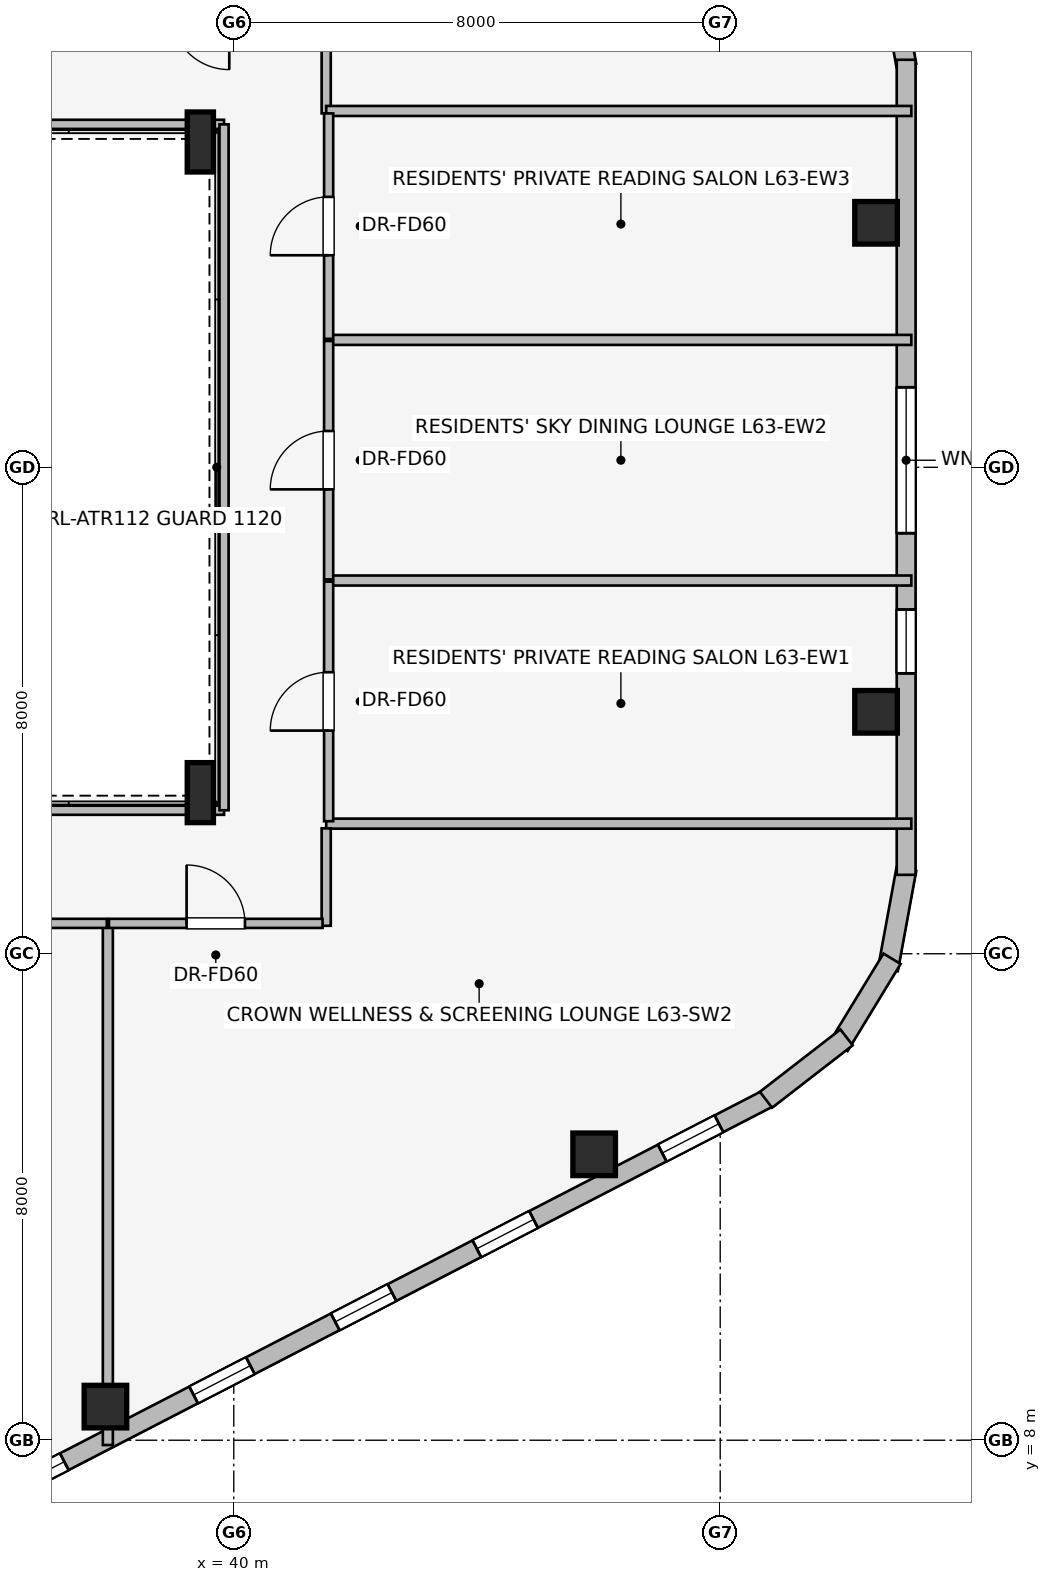
"""IFC4 building model, lengths in metres.
Left out: names, types, materials, properties, quantities, classifications, styles, units other than length and angle.
Written with IfcOpenShell. Run it as: python <this file> out.ifc"""

import sys

from ifc_helpers import new_model, si_unit, direction, frame, frame_2d, origin, origin_2d, place, context, subcontext, project, spatial, rectangle, i_section, extrude, element, fill, save


model = new_model("IFC4")
c1 = context("Model", 3, precision=1e-05, world=origin(), true_north=direction((0.0, 1.0)))
c2 = subcontext(c1, "Body", "Model", "MODEL_VIEW")
j1 = project(units=[si_unit("LENGTHUNIT", "METRE"), si_unit("PLANEANGLEUNIT", "RADIAN")], contexts=[c1])
p1 = place(None, origin())
s1 = spatial("IfcSite", under=j1, at=p1, CompositionType="ELEMENT")
p2 = place(p1, origin())
s2 = spatial("IfcBuilding", under=s1, at=p2, CompositionType="ELEMENT")
p3 = place(p2, frame((0.0, 0.0, 231.25)))
s3 = spatial("IfcBuildingStorey", under=s2, at=p3, CompositionType="ELEMENT", Elevation=231.25)
for number, where, z_axis, x_axis in (
    (1, (37.889, 8.553, 0.0), (0.0, 0.0, 1.0), (1.0, 0.0, 0.0)),
    (2, (45.927, 12.702, 0.0), (0.0, 0.0, 1.0), (1.0, 0.0, 0.0)),
    (3, (50.563, 19.979, 0.0), (0.0, 0.0, 1.0), (1.0, 0.0, 0.0)),
    (4, (50.563, 28.021, 0.0), (0.0, 0.0, 1.0), (1.0, 0.0, 0.0)),
):
    element("IfcColumn", number, at=place(p3, frame(where, z_axis=z_axis, x_axis=x_axis)), inside=s3, PredefinedType="COLUMN", context=c2, shape_type="SweptSolid", body=[
        extrude(rectangle(XDim=0.7, YDim=0.7, at=origin_2d()), origin(), (0.0, 0.0, 1.0), 3.55),
    ])
for number, where, z_axis, x_axis in (
    (5, (39.45, 18.65, 0.0), (0.0, 0.0, 1.0), (1.0, 0.0, 0.0)),
    (6, (39.45, 29.35, 0.0), (0.0, 0.0, 1.0), (1.0, 0.0, 0.0)),
):
    element("IfcColumn", number, at=place(p3, frame(where, z_axis=z_axis, x_axis=x_axis)), inside=s3, PredefinedType="COLUMN", context=c2, shape_type="SweptSolid", body=[
        extrude(i_section(OverallWidth=0.431, OverallDepth=0.987, WebThickness=0.034, FlangeThickness=0.062, at=origin_2d()), origin(), (0.0, 0.0, 1.0), 3.55),
    ])
p4 = place(p3, frame((50.759, 32.257, 0.0), z_axis=(0.0, 0.0, 1.0), x_axis=(0.180691763044, -0.983539773862, 0.0)))
e7 = element("IfcWall", 7, at=p4, inside=s3, PredefinedType="STANDARD", context=c2, shape_type="SweptSolid", body=[
    extrude(rectangle(XDim=1.677, YDim=0.33, at=frame_2d((0.838, 0.0))), origin(), (0.0, 0.0, 1.0), 3.26),
])
p5 = place(p3, frame((48.834, 13.646, 0.0), z_axis=(0.0, 0.0, 1.0), x_axis=(-0.888581481622, -0.458718814218, 0.0)))
e8 = element("IfcWall", 8, at=p5, inside=s3, PredefinedType="STANDARD", context=c2, shape_type="SweptSolid", body=[
    extrude(rectangle(XDim=15.077, YDim=0.31, at=frame_2d((7.539, 0.0))), origin(), (0.0, 0.0, 1.0), 3.26),
])
p6 = place(p5, frame((0.962, 0.0, 0.75)))
e9 = element("IfcOpeningElement", 9, at=p6, cuts=e8, PredefinedType="OPENING", context=c2, shape_type="SweptSolid", body=[
    extrude(rectangle(XDim=1.05, YDim=1.4, at=frame_2d((0.525, 0.7))), frame((0.0, 0.165, 0.0), z_axis=(0.0, -1.0, 0.0), x_axis=(1.0, 0.0, 0.0)), (0.0, 0.0, 1.0), 0.33),
])
p7 = place(p5, frame((4.393, 0.0, 0.75)))
e10 = element("IfcOpeningElement", 10, at=p7, cuts=e8, PredefinedType="OPENING", context=c2, shape_type="SweptSolid", body=[
    extrude(rectangle(XDim=1.05, YDim=1.4, at=frame_2d((0.525, 0.7))), frame((0.0, 0.165, 0.0), z_axis=(0.0, -1.0, 0.0), x_axis=(1.0, 0.0, 0.0)), (0.0, 0.0, 1.0), 0.33),
])
p8 = place(p5, frame((7.014, 0.0, 0.75)))
e11 = element("IfcOpeningElement", 11, at=p8, cuts=e8, PredefinedType="OPENING", context=c2, shape_type="SweptSolid", body=[
    extrude(rectangle(XDim=1.05, YDim=1.4, at=frame_2d((0.525, 0.7))), frame((0.0, 0.165, 0.0), z_axis=(0.0, -1.0, 0.0), x_axis=(1.0, 0.0, 0.0)), (0.0, 0.0, 1.0), 0.33),
])
p9 = place(p5, frame((9.635, 0.0, 0.75)))
e12 = element("IfcOpeningElement", 12, at=p9, cuts=e8, PredefinedType="OPENING", context=c2, shape_type="SweptSolid", body=[
    extrude(rectangle(XDim=1.05, YDim=1.4, at=frame_2d((0.525, 0.7))), frame((0.0, 0.165, 0.0), z_axis=(0.0, -1.0, 0.0), x_axis=(1.0, 0.0, 0.0)), (0.0, 0.0, 1.0), 0.33),
])
p10 = place(p5, frame((13.078, 0.0, 0.75)))
e13 = element("IfcOpeningElement", 13, at=p10, cuts=e8, PredefinedType="OPENING", context=c2, shape_type="SweptSolid", body=[
    extrude(rectangle(XDim=1.05, YDim=1.4, at=frame_2d((0.525, 0.7))), frame((0.0, 0.165, 0.0), z_axis=(0.0, -1.0, 0.0), x_axis=(1.0, 0.0, 0.0)), (0.0, 0.0, 1.0), 0.33),
])
p11 = place(p3, frame((51.062, 17.392, 0.0), z_axis=(0.0, 0.0, 1.0), x_axis=(-0.180691763044, -0.983539773862, 0.0)))
e14 = element("IfcWall", 14, at=p11, inside=s3, PredefinedType="STANDARD", context=c2, shape_type="SweptSolid", body=[
    extrude(rectangle(XDim=1.677, YDim=0.33, at=frame_2d((0.838, 0.0))), origin(), (0.0, 0.0, 1.0), 3.26),
])
p12 = place(p3, frame((50.826, 15.918, 0.0), z_axis=(0.0, 0.0, 1.0), x_axis=(-0.520325409202, -0.853968072318, 0.0)))
e15 = element("IfcWall", 15, at=p12, inside=s3, PredefinedType="STANDARD", context=c2, shape_type="SweptSolid", body=[
    extrude(rectangle(XDim=1.678, YDim=0.33, at=frame_2d((0.839, 0.0))), origin(), (0.0, 0.0, 1.0), 3.26),
])
p13 = place(p3, frame((50.078, 14.625, 0.0), z_axis=(0.0, 0.0, 1.0), x_axis=(-0.790691856293, -0.61221433207, 0.0)))
e16 = element("IfcWall", 16, at=p13, inside=s3, PredefinedType="STANDARD", context=c2, shape_type="SweptSolid", body=[
    extrude(rectangle(XDim=1.676, YDim=0.33, at=frame_2d((0.838, 0.0))), origin(), (0.0, 0.0, 1.0), 3.26),
])
p14 = place(p3, frame((51.058, 30.702, 0.0), z_axis=(0.0, 0.0, 1.0), x_axis=(0.0, -1.0, 0.0)))
e17 = element("IfcWall", 17, at=p14, inside=s3, PredefinedType="STANDARD", context=c2, shape_type="SweptSolid", body=[
    extrude(rectangle(XDim=13.404, YDim=0.31, at=frame_2d((6.702, 0.0))), origin(), (0.0, 0.0, 1.0), 3.26),
])
p15 = place(p14, frame((5.386, 0.0, 0.75)))
e18 = element("IfcOpeningElement", 18, at=p15, cuts=e17, PredefinedType="OPENING", context=c2, shape_type="SweptSolid", body=[
    extrude(rectangle(XDim=2.4, YDim=1.6, at=frame_2d((1.2, 0.8))), frame((0.0, 0.165, 0.0), z_axis=(0.0, -1.0, 0.0), x_axis=(1.0, 0.0, 0.0)), (0.0, 0.0, 1.0), 0.33),
])
p16 = place(p14, frame((9.04, 0.0, 0.75)))
e19 = element("IfcOpeningElement", 19, at=p16, cuts=e17, PredefinedType="OPENING", context=c2, shape_type="SweptSolid", body=[
    extrude(rectangle(XDim=1.05, YDim=1.4, at=frame_2d((0.525, 0.7))), frame((0.0, 0.165, 0.0), z_axis=(0.0, -1.0, 0.0), x_axis=(1.0, 0.0, 0.0)), (0.0, 0.0, 1.0), 0.33),
])
p17 = place(p3, frame((27.675, 18.36, 0.0), z_axis=(0.0, 0.0, 1.0), x_axis=(1.0, 0.0, 0.0)))
e20 = element("IfcWall", 20, at=p17, inside=s3, PredefinedType="PARTITIONING", context=c2, shape_type="SweptSolid", body=[
    extrude(rectangle(XDim=12.165, YDim=0.15, at=frame_2d((6.083, 0.0))), origin(), (0.0, 0.0, 1.0), 2.401),
])
p18 = place(p3, frame((39.84, 29.64, 0.0), z_axis=(0.0, 0.0, 1.0), x_axis=(-1.0, 0.0, 0.0)))
e21 = element("IfcWall", 21, at=p18, inside=s3, PredefinedType="PARTITIONING", context=c2, shape_type="SweptSolid", body=[
    extrude(rectangle(XDim=12.203, YDim=0.15, at=frame_2d((6.102, 0.0))), origin(), (0.0, 0.0, 1.0), 2.401),
])
p19 = place(p3, frame((39.84, 18.36, 0.0), z_axis=(0.0, 0.0, 1.0), x_axis=(0.0, 1.0, 0.0)))
e22 = element("IfcWall", 22, at=p19, inside=s3, PredefinedType="PARTITIONING", context=c2, shape_type="SweptSolid", body=[
    extrude(rectangle(XDim=11.28, YDim=0.15, at=frame_2d((5.64, 0.0))), origin(), (0.0, 0.0, 1.0), 3.26),
])
p20 = place(p3, frame((41.52, 29.82, 0.0), z_axis=(0.0, 0.0, 1.0), x_axis=(0.0, 1.0, 0.0)))
e23 = element("IfcWall", 23, at=p20, inside=s3, PredefinedType="PARTITIONING", context=c2, shape_type="SweptSolid", body=[
    extrude(rectangle(XDim=1.72, YDim=0.15, at=frame_2d((0.86, 0.0))), origin(), (0.0, 0.0, 1.0), 3.26),
])
for number, where, z_axis, x_axis in (
    (24, (41.52, 18.14, 0.0), (0.0, 0.0, 1.0), (1.0, 0.0, 0.0)),
    (25, (41.52, 29.86, 0.0), (0.0, 0.0, 1.0), (1.0, 0.0, 0.0)),
):
    element("IfcWall", number, at=place(p3, frame(where, z_axis=z_axis, x_axis=x_axis)), inside=s3, PredefinedType="PARTITIONING", context=c2, shape_type="SweptSolid", body=[
        extrude(rectangle(XDim=9.623, YDim=0.165, at=frame_2d((4.812, 0.0))), origin(), (0.0, 0.0, 1.0), 3.26),
    ])
for number, where, z_axis, x_axis in (
    (26, (41.59, 22.138, 0.0), (0.0, 0.0, 1.0), (1.0, 0.0, 0.0)),
    (27, (41.59, 26.095, 0.0), (0.0, 0.0, 1.0), (1.0, 0.0, 0.0)),
):
    element("IfcWall", number, at=place(p3, frame(where, z_axis=z_axis, x_axis=x_axis)), inside=s3, PredefinedType="PARTITIONING", context=c2, shape_type="SweptSolid", body=[
        extrude(rectangle(XDim=9.553, YDim=0.165, at=frame_2d((4.776, 0.0))), origin(), (0.0, 0.0, 1.0), 3.26),
    ])
p21 = place(p3, frame((41.56, 18.18, 0.0), z_axis=(0.0, 0.0, 1.0), x_axis=(0.0, 1.0, 0.0)))
e28 = element("IfcWall", 28, at=p21, inside=s3, PredefinedType="PARTITIONING", context=c2, shape_type="SweptSolid", body=[
    extrude(rectangle(XDim=3.94, YDim=0.15, at=frame_2d((1.97, 0.0))), origin(), (0.0, 0.0, 1.0), 3.26),
])
p22 = place(p21, frame((1.49, 0.0, 0.0)))
e29 = element("IfcOpeningElement", 29, at=p22, cuts=e28, PredefinedType="OPENING", context=c2, shape_type="SweptSolid", body=[
    extrude(rectangle(XDim=0.96, YDim=2.0, at=frame_2d((0.48, 1.0))), frame((0.0, 0.085, 0.0), z_axis=(0.0, -1.0, 0.0), x_axis=(1.0, 0.0, 0.0)), (0.0, 0.0, 1.0), 0.17),
])
p23 = place(p3, frame((41.56, 22.156, 0.0), z_axis=(0.0, 0.0, 1.0), x_axis=(0.0, 1.0, 0.0)))
e30 = element("IfcWall", 30, at=p23, inside=s3, PredefinedType="PARTITIONING", context=c2, shape_type="SweptSolid", body=[
    extrude(rectangle(XDim=3.921, YDim=0.15, at=frame_2d((1.96, 0.0))), origin(), (0.0, 0.0, 1.0), 3.26),
])
p24 = place(p23, frame((1.481, 0.0, 0.0)))
e31 = element("IfcOpeningElement", 31, at=p24, cuts=e30, PredefinedType="OPENING", context=c2, shape_type="SweptSolid", body=[
    extrude(rectangle(XDim=0.96, YDim=2.0, at=frame_2d((0.48, 1.0))), frame((0.0, 0.085, 0.0), z_axis=(0.0, -1.0, 0.0), x_axis=(1.0, 0.0, 0.0)), (0.0, 0.0, 1.0), 0.17),
])
p25 = place(p3, frame((41.56, 26.113, 0.0), z_axis=(0.0, 0.0, 1.0), x_axis=(0.0, 1.0, 0.0)))
e32 = element("IfcWall", 32, at=p25, inside=s3, PredefinedType="PARTITIONING", context=c2, shape_type="SweptSolid", body=[
    extrude(rectangle(XDim=3.707, YDim=0.15, at=frame_2d((1.854, 0.0))), origin(), (0.0, 0.0, 1.0), 3.26),
])
p26 = place(p25, frame((1.374, 0.0, 0.0)))
e33 = element("IfcOpeningElement", 33, at=p26, cuts=e32, PredefinedType="OPENING", context=c2, shape_type="SweptSolid", body=[
    extrude(rectangle(XDim=0.96, YDim=2.0, at=frame_2d((0.48, 1.0))), frame((0.0, 0.085, 0.0), z_axis=(0.0, -1.0, 0.0), x_axis=(1.0, 0.0, 0.0)), (0.0, 0.0, 1.0), 0.17),
])
p27 = place(p3, frame((41.52, 16.46, 0.0), z_axis=(0.0, 0.0, 1.0), x_axis=(0.0, 1.0, 0.0)))
e34 = element("IfcWall", 34, at=p27, inside=s3, PredefinedType="PARTITIONING", context=c2, shape_type="SweptSolid", body=[
    extrude(rectangle(XDim=1.602, YDim=0.15, at=frame_2d((0.801, 0.0))), origin(), (0.0, 0.0, 1.0), 3.26),
])
p28 = place(p3, frame((37.929, 7.921, 0.0), z_axis=(0.0, 0.0, 1.0), x_axis=(0.0, 1.0, 0.0)))
e35 = element("IfcWall", 35, at=p28, inside=s3, PredefinedType="PARTITIONING", context=c2, shape_type="SweptSolid", body=[
    extrude(rectangle(XDim=8.549, YDim=0.165, at=frame_2d((4.274, 0.0))), origin(), (0.0, 0.0, 1.0), 3.26),
])
p29 = place(p3, frame((32.85, 16.5, 0.0), z_axis=(0.0, 0.0, 1.0), x_axis=(1.0, 0.0, 0.0)))
e36 = element("IfcWall", 36, at=p29, inside=s3, PredefinedType="PARTITIONING", context=c2, shape_type="SweptSolid", body=[
    extrude(rectangle(XDim=5.061, YDim=0.15, at=frame_2d((2.53, 0.0))), origin(), (0.0, 0.0, 1.0), 3.26),
])
p30 = place(p29, frame((2.051, 0.0, 0.0)))
e37 = element("IfcOpeningElement", 37, at=p30, cuts=e36, PredefinedType="OPENING", context=c2, shape_type="SweptSolid", body=[
    extrude(rectangle(XDim=0.96, YDim=2.0, at=frame_2d((0.48, 1.0))), frame((0.0, 0.085, 0.0), z_axis=(0.0, -1.0, 0.0), x_axis=(1.0, 0.0, 0.0)), (0.0, 0.0, 1.0), 0.17),
])
p31 = place(p3, frame((37.947, 16.5, 0.0), z_axis=(0.0, 0.0, 1.0), x_axis=(1.0, 0.0, 0.0)))
e38 = element("IfcWall", 38, at=p31, inside=s3, PredefinedType="PARTITIONING", context=c2, shape_type="SweptSolid", body=[
    extrude(rectangle(XDim=3.513, YDim=0.15, at=frame_2d((1.756, 0.0))), origin(), (0.0, 0.0, 1.0), 3.26),
])
p32 = place(p31, frame((1.277, 0.0, 0.0)))
e39 = element("IfcOpeningElement", 39, at=p32, cuts=e38, PredefinedType="OPENING", context=c2, shape_type="SweptSolid", body=[
    extrude(rectangle(XDim=0.96, YDim=2.0, at=frame_2d((0.48, 1.0))), frame((0.0, 0.085, 0.0), z_axis=(0.0, -1.0, 0.0), x_axis=(1.0, 0.0, 0.0)), (0.0, 0.0, 1.0), 0.17),
])
p33 = place(p6, origin())
e40 = element("IfcWindow", 40, at=p33, inside=s3, PartitioningType="SINGLE_PANEL", PredefinedType="WINDOW", context=c2, shape_type="SweptSolid", body=[
    extrude(rectangle(XDim=1.05, YDim=1.4, at=frame_2d((0.525, 0.7))), frame((0.0, 0.03, 0.0), z_axis=(0.0, -1.0, 0.0), x_axis=(1.0, 0.0, 0.0)), (0.0, 0.0, 1.0), 0.06),
])
fill(e9, e40)
p34 = place(p7, origin())
e41 = element("IfcWindow", 41, at=p34, inside=s3, PartitioningType="SINGLE_PANEL", PredefinedType="WINDOW", context=c2, shape_type="SweptSolid", body=[
    extrude(rectangle(XDim=1.05, YDim=1.4, at=frame_2d((0.525, 0.7))), frame((0.0, 0.03, 0.0), z_axis=(0.0, -1.0, 0.0), x_axis=(1.0, 0.0, 0.0)), (0.0, 0.0, 1.0), 0.06),
])
fill(e10, e41)
p35 = place(p8, origin())
e42 = element("IfcWindow", 42, at=p35, inside=s3, PartitioningType="SINGLE_PANEL", PredefinedType="WINDOW", context=c2, shape_type="SweptSolid", body=[
    extrude(rectangle(XDim=1.05, YDim=1.4, at=frame_2d((0.525, 0.7))), frame((0.0, 0.03, 0.0), z_axis=(0.0, -1.0, 0.0), x_axis=(1.0, 0.0, 0.0)), (0.0, 0.0, 1.0), 0.06),
])
fill(e11, e42)
p36 = place(p9, origin())
e43 = element("IfcWindow", 43, at=p36, inside=s3, PartitioningType="SINGLE_PANEL", PredefinedType="WINDOW", context=c2, shape_type="SweptSolid", body=[
    extrude(rectangle(XDim=1.05, YDim=1.4, at=frame_2d((0.525, 0.7))), frame((0.0, 0.03, 0.0), z_axis=(0.0, -1.0, 0.0), x_axis=(1.0, 0.0, 0.0)), (0.0, 0.0, 1.0), 0.06),
])
fill(e12, e43)
p37 = place(p10, origin())
e44 = element("IfcWindow", 44, at=p37, inside=s3, PartitioningType="SINGLE_PANEL", PredefinedType="WINDOW", context=c2, shape_type="SweptSolid", body=[
    extrude(rectangle(XDim=1.05, YDim=1.4, at=frame_2d((0.525, 0.7))), frame((0.0, 0.03, 0.0), z_axis=(0.0, -1.0, 0.0), x_axis=(1.0, 0.0, 0.0)), (0.0, 0.0, 1.0), 0.06),
])
fill(e13, e44)
p38 = place(p15, origin())
e45 = element("IfcWindow", 45, at=p38, inside=s3, PartitioningType="SINGLE_PANEL", PredefinedType="WINDOW", context=c2, shape_type="SweptSolid", body=[
    extrude(rectangle(XDim=2.4, YDim=1.6, at=frame_2d((1.2, 0.8))), frame((0.0, 0.03, 0.0), z_axis=(0.0, -1.0, 0.0), x_axis=(1.0, 0.0, 0.0)), (0.0, 0.0, 1.0), 0.06),
])
fill(e18, e45)
p39 = place(p16, origin())
e46 = element("IfcWindow", 46, at=p39, inside=s3, PartitioningType="SINGLE_PANEL", PredefinedType="WINDOW", context=c2, shape_type="SweptSolid", body=[
    extrude(rectangle(XDim=1.05, YDim=1.4, at=frame_2d((0.525, 0.7))), frame((0.0, 0.03, 0.0), z_axis=(0.0, -1.0, 0.0), x_axis=(1.0, 0.0, 0.0)), (0.0, 0.0, 1.0), 0.06),
])
fill(e19, e46)
p40 = place(p22, origin())
e47 = element("IfcDoor", 47, at=p40, inside=s3, OperationType="SINGLE_SWING_LEFT", PredefinedType="DOOR", context=c2, shape_type="SweptSolid", body=[
    extrude(rectangle(XDim=0.96, YDim=2.0, at=frame_2d((0.48, 1.0))), frame((0.0, 0.025, 0.0), z_axis=(0.0, -1.0, 0.0), x_axis=(1.0, 0.0, 0.0)), (0.0, 0.0, 1.0), 0.05),
])
fill(e29, e47)
p41 = place(p24, origin())
e48 = element("IfcDoor", 48, at=p41, inside=s3, OperationType="SINGLE_SWING_LEFT", PredefinedType="DOOR", context=c2, shape_type="SweptSolid", body=[
    extrude(rectangle(XDim=0.96, YDim=2.0, at=frame_2d((0.48, 1.0))), frame((0.0, 0.025, 0.0), z_axis=(0.0, -1.0, 0.0), x_axis=(1.0, 0.0, 0.0)), (0.0, 0.0, 1.0), 0.05),
])
fill(e31, e48)
p42 = place(p26, origin())
e49 = element("IfcDoor", 49, at=p42, inside=s3, OperationType="SINGLE_SWING_LEFT", PredefinedType="DOOR", context=c2, shape_type="SweptSolid", body=[
    extrude(rectangle(XDim=0.96, YDim=2.0, at=frame_2d((0.48, 1.0))), frame((0.0, 0.025, 0.0), z_axis=(0.0, -1.0, 0.0), x_axis=(1.0, 0.0, 0.0)), (0.0, 0.0, 1.0), 0.05),
])
fill(e33, e49)
p43 = place(p32, origin())
e50 = element("IfcDoor", 50, at=p43, inside=s3, OperationType="SINGLE_SWING_LEFT", PredefinedType="DOOR", context=c2, shape_type="SweptSolid", body=[
    extrude(rectangle(XDim=0.96, YDim=2.0, at=frame_2d((0.48, 1.0))), frame((0.0, 0.025, 0.0), z_axis=(0.0, -1.0, 0.0), x_axis=(1.0, 0.0, 0.0)), (0.0, 0.0, 1.0), 0.05),
])
fill(e39, e50)
save(model, sys.argv[1])
